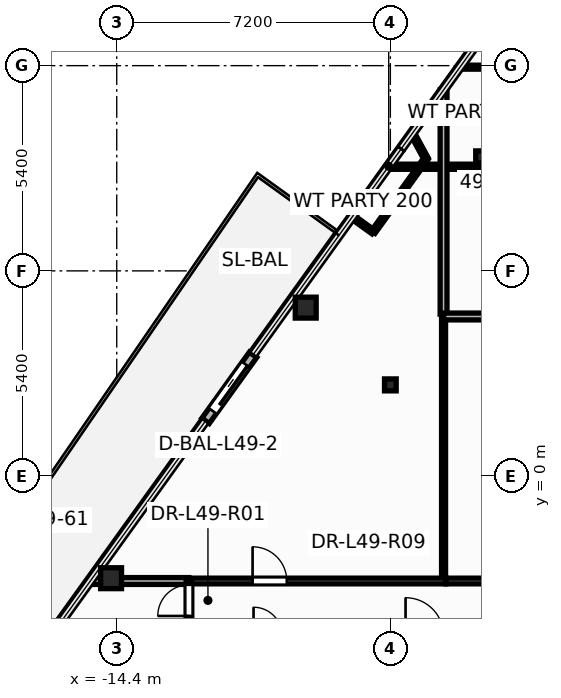
"""IFC4 building model, lengths in metres.
Left out: names, types, materials, properties, quantities, classifications, styles, units other than length and angle.
Written with IfcOpenShell. Run it as: python <this file> out.ifc"""

import sys

from ifc_helpers import new_model, si_unit, direction, frame, frame_2d, origin, origin_2d, place, context, subcontext, project, spatial, rectangle, hollow_circle, i_section, extrude, element, fill, save


model = new_model("IFC4")
c1 = context("Model", 3, precision=1e-05, world=origin(), true_north=direction((0.0, 1.0)))
c2 = subcontext(c1, "Body", "Model", "MODEL_VIEW")
j1 = project(units=[si_unit("LENGTHUNIT", "METRE"), si_unit("PLANEANGLEUNIT", "RADIAN")], contexts=[c1])
p1 = place(None, origin())
s1 = spatial("IfcSite", under=j1, at=p1, CompositionType="ELEMENT")
p2 = place(p1, origin())
s2 = spatial("IfcBuilding", under=s1, at=p2, CompositionType="ELEMENT")
p3 = place(p2, frame((0.0, 0.0, 189.3)))
s3 = spatial("IfcBuildingStorey", under=s2, at=p3, CompositionType="ELEMENT", Elevation=189.3)
for number, where, z_axis, x_axis in (
    (1, (-9.427, 4.433, 0.0), (0.0, 0.0, 1.0), (1.0, 0.0, 0.0)),
    (2, (-14.549, -2.686, 0.0), (0.0, 0.0, 1.0), (1.0, 0.0, 0.0)),
):
    element("IfcColumn", number, at=place(p3, frame(where, z_axis=z_axis, x_axis=x_axis)), inside=s3, PredefinedType="COLUMN", context=c2, shape_type="SweptSolid", body=[
        extrude(hollow_circle(Radius=0.275, WallThickness=0.024, at=origin_2d()), origin(), (0.0, 0.0, 1.0), 3.6),
    ])
for number, where, z_axis, x_axis in (
    (3, (-7.2, 2.4, 0.0), (0.0, 0.0, 1.0), (1.0, 0.0, 0.0)),
    (4, (-4.8, 8.4, 0.0), (0.0, 0.0, 1.0), (1.0, 0.0, 0.0)),
):
    element("IfcColumn", number, at=place(p3, frame(where, z_axis=z_axis, x_axis=x_axis)), inside=s3, PredefinedType="COLUMN", context=c2, shape_type="SweptSolid", body=[
        extrude(i_section(OverallWidth=0.307, OverallDepth=0.314, WebThickness=0.012, FlangeThickness=0.019, at=origin_2d()), origin(), (0.0, 0.0, 1.0), 3.6),
    ])
p4 = place(p3, frame((-10.813, 3.192, -0.015), z_axis=(0.0, 0.0, 1.0), x_axis=(-0.583965085393, -0.811778774693, 0.0)))
e5 = element("IfcWall", 5, at=p4, inside=s3, PredefinedType="STANDARD", context=c2, shape_type="SweptSolid", body=[
    extrude(rectangle(XDim=2.14, YDim=0.24, at=frame_2d((1.07, 0.0))), origin(), (0.0, 0.0, 1.0), 2.807),
])
p5 = place(p4, frame((0.32, 0.0, 0.015)))
e6 = element("IfcOpeningElement", 6, at=p5, cuts=e5, PredefinedType="OPENING", context=c2, shape_type="SweptSolid", body=[
    extrude(rectangle(XDim=1.506, YDim=2.204, at=frame_2d((0.75, 1.102))), frame((0.0, 0.13, 0.0), z_axis=(0.0, -1.0, 0.0), x_axis=(1.0, 0.0, 0.0)), (0.0, 0.0, 1.0), 0.26),
])
p6 = place(p3, frame((-5.368, 10.76, 0.0), z_axis=(0.0, 0.0, 1.0), x_axis=(1.0, 0.0, 0.0)))
e7 = element("IfcWall", 7, at=p6, inside=s3, PredefinedType="PARTITIONING", context=c2, shape_type="SweptSolid", body=[
    extrude(rectangle(XDim=10.737, YDim=0.105, at=frame_2d((5.368, 0.0))), origin(), (0.0, 0.0, 1.0), 2.625),
])
p7 = place(p6, frame((3.416, 0.0, 0.0)))
e8 = element("IfcOpeningElement", 8, at=p7, cuts=e7, PredefinedType="OPENING", context=c2, shape_type="SweptSolid", body=[
    extrude(rectangle(XDim=0.886, YDim=2.104, at=frame_2d((0.44, 1.052))), frame((0.0, 0.062, 0.0), z_axis=(0.0, -1.0, 0.0), x_axis=(1.0, 0.0, 0.0)), (0.0, 0.0, 1.0), 0.125),
])
p8 = place(p3, frame((-5.8, -2.76, 0.0), z_axis=(0.0, 0.0, 1.0), x_axis=(0.0, 1.0, 0.0)))
e9 = element("IfcWall", 9, at=p8, inside=s3, PredefinedType="PARTITIONING", context=c2, shape_type="SweptSolid", body=[
    extrude(rectangle(XDim=7.02, YDim=0.105, at=frame_2d((3.51, 0.0))), origin(), (0.0, 0.0, 1.0), 2.325),
])
p9 = place(p3, frame((-12.5, -2.76, 0.0), z_axis=(0.0, 0.0, 1.0), x_axis=(1.0, 0.0, 0.0)))
e10 = element("IfcWall", 10, at=p9, inside=s3, PredefinedType="PARTITIONING", context=c2, shape_type="SweptSolid", body=[
    extrude(rectangle(XDim=6.76, YDim=0.15, at=frame_2d((3.38, 0.0))), origin(), (0.0, 0.0, 1.0), 2.325),
])
p10 = place(p9, frame((1.675, 0.0, 0.0)))
e11 = element("IfcOpeningElement", 11, at=p10, cuts=e10, PredefinedType="OPENING", context=c2, shape_type="SweptSolid", body=[
    extrude(rectangle(XDim=0.906, YDim=2.104, at=frame_2d((0.45, 1.052))), frame((0.0, 0.085, 0.0), z_axis=(0.0, -1.0, 0.0), x_axis=(1.0, 0.0, 0.0)), (0.0, 0.0, 1.0), 0.17),
])
p11 = place(p3, frame((-5.738, -2.76, 0.0), z_axis=(0.0, 0.0, 1.0), x_axis=(1.0, 0.0, 0.0)))
e12 = element("IfcWall", 12, at=p11, inside=s3, PredefinedType="PARTITIONING", context=c2, shape_type="SweptSolid", body=[
    extrude(rectangle(XDim=6.378, YDim=0.15, at=frame_2d((3.189, 0.0))), origin(), (0.0, 0.0, 1.0), 2.325),
])
p12 = place(p3, frame((-7.253, 8.14, 0.0), z_axis=(0.0, 0.0, 1.0), x_axis=(1.0, 0.0, 0.0)))
e13 = element("IfcWall", 13, at=p12, inside=s3, PredefinedType="PARTITIONING", context=c2, shape_type="SweptSolid", body=[
    extrude(rectangle(XDim=6.333, YDim=0.135, at=frame_2d((3.167, 0.0))), origin(), (0.0, 0.0, 1.0), 2.625),
])
p13 = place(p3, frame((-5.8, 4.262, 0.0), z_axis=(0.0, 0.0, 1.0), x_axis=(0.0, 1.0, 0.0)))
e14 = element("IfcWall", 14, at=p13, inside=s3, PredefinedType="PARTITIONING", context=c2, shape_type="SweptSolid", body=[
    extrude(rectangle(XDim=5.898, YDim=0.18, at=frame_2d((2.949, 0.0))), origin(), (0.0, 0.0, 1.0), 2.625),
])
p14 = place(p3, frame((-5.8, 4.2, 0.0), z_axis=(0.0, 0.0, 1.0), x_axis=(1.0, 0.0, 0.0)))
e15 = element("IfcWall", 15, at=p14, inside=s3, PredefinedType="PARTITIONING", context=c2, shape_type="SweptSolid", body=[
    extrude(rectangle(XDim=6.44, YDim=0.18, at=frame_2d((3.22, 0.0))), origin(), (0.0, 0.0, 1.0), 2.325),
])
p15 = place(p3, frame((-15.095, -2.76, 0.0), z_axis=(0.0, 0.0, 1.0), x_axis=(1.0, 0.0, 0.0)))
e16 = element("IfcWall", 16, at=p15, inside=s3, PredefinedType="PARTITIONING", context=c2, shape_type="SweptSolid", body=[
    extrude(rectangle(XDim=2.595, YDim=0.18, at=frame_2d((1.297, 0.0))), origin(), (0.0, 0.0, 1.0), 2.625),
])
p16 = place(p3, frame((-6.261, 8.354, 0.0), z_axis=(0.0, 0.0, 1.0), x_axis=(-0.583963896956, -0.811779629611, 0.0)))
e17 = element("IfcWall", 17, at=p16, inside=s3, PredefinedType="PARTITIONING", context=c2, shape_type="SweptSolid", body=[
    extrude(rectangle(XDim=2.378, YDim=0.12, at=frame_2d((1.189, 0.0))), origin(), (0.0, 0.0, 1.0), 3.35),
])
p17 = place(p3, frame((-12.5, -4.24, 0.0), z_axis=(0.0, 0.0, 1.0), x_axis=(0.0, 1.0, 0.0)))
e18 = element("IfcWall", 18, at=p17, inside=s3, PredefinedType="PARTITIONING", context=c2, shape_type="SweptSolid", body=[
    extrude(rectangle(XDim=1.48, YDim=0.15, at=frame_2d((0.74, 0.0))), origin(), (0.0, 0.0, 1.0), 2.325),
])
p18 = place(p17, frame((0.56, 0.0, 0.0)))
e19 = element("IfcOpeningElement", 19, at=p18, cuts=e18, PredefinedType="OPENING", context=c2, shape_type="SweptSolid", body=[
    extrude(rectangle(XDim=0.826, YDim=2.104, at=frame_2d((0.41, 1.052))), frame((0.0, 0.085, 0.0), z_axis=(0.0, -1.0, 0.0), x_axis=(1.0, 0.0, 0.0)), (0.0, 0.0, 1.0), 0.17),
])
p19 = place(p3, frame((-6.617, 9.007, 0.0), z_axis=(0.0, 0.0, 1.0), x_axis=(0.4779319316, -0.878396874287, 0.0)))
e20 = element("IfcWall", 20, at=p19, inside=s3, PredefinedType="PARTITIONING", context=c2, shape_type="SweptSolid", body=[
    extrude(rectangle(XDim=0.744, YDim=0.12, at=frame_2d((0.372, 0.0))), origin(), (0.0, 0.0, 1.0), 2.792),
])
p20 = place(p3, frame((-7.65, 6.424, 0.0), z_axis=(0.0, 0.0, 1.0), x_axis=(-0.811734696256, 0.584026354622, 0.0)))
e21 = element("IfcWall", 21, at=p20, inside=s3, PredefinedType="PARTITIONING", context=c2, shape_type="SweptSolid", body=[
    extrude(rectangle(XDim=0.67, YDim=0.12, at=frame_2d((0.335, 0.0))), origin(), (0.0, 0.0, 1.0), 2.792),
])
p21 = place(p5, origin())
e22 = element("IfcDoor", 22, at=p21, inside=s3, OperationType="SLIDING_TO_RIGHT", PredefinedType="DOOR", context=c2, shape_type="SweptSolid", body=[
    extrude(rectangle(XDim=1.5, YDim=2.2, at=frame_2d((0.75, 1.1))), frame((0.0, 0.025, 0.0), z_axis=(0.0, -1.0, 0.0), x_axis=(1.0, 0.0, 0.0)), (0.0, 0.0, 1.0), 0.05),
])
fill(e6, e22)
p22 = place(p18, origin())
e23 = element("IfcDoor", 23, at=p22, inside=s3, OperationType="SINGLE_SWING_LEFT", PredefinedType="DOOR", context=c2, shape_type="SweptSolid", body=[
    extrude(rectangle(XDim=0.82, YDim=2.1, at=frame_2d((0.41, 1.05))), frame((0.0, 0.025, 0.0), z_axis=(0.0, -1.0, 0.0), x_axis=(1.0, 0.0, 0.0)), (0.0, 0.0, 1.0), 0.05),
])
fill(e19, e23)
p23 = place(p10, origin())
e24 = element("IfcDoor", 24, at=p23, inside=s3, OperationType="SINGLE_SWING_LEFT", PredefinedType="DOOR", context=c2, shape_type="SweptSolid", body=[
    extrude(rectangle(XDim=0.9, YDim=2.1, at=frame_2d((0.45, 1.05))), frame((0.0, 0.025, 0.0), z_axis=(0.0, -1.0, 0.0), x_axis=(1.0, 0.0, 0.0)), (0.0, 0.0, 1.0), 0.05),
])
fill(e11, e24)
save(model, sys.argv[1])
